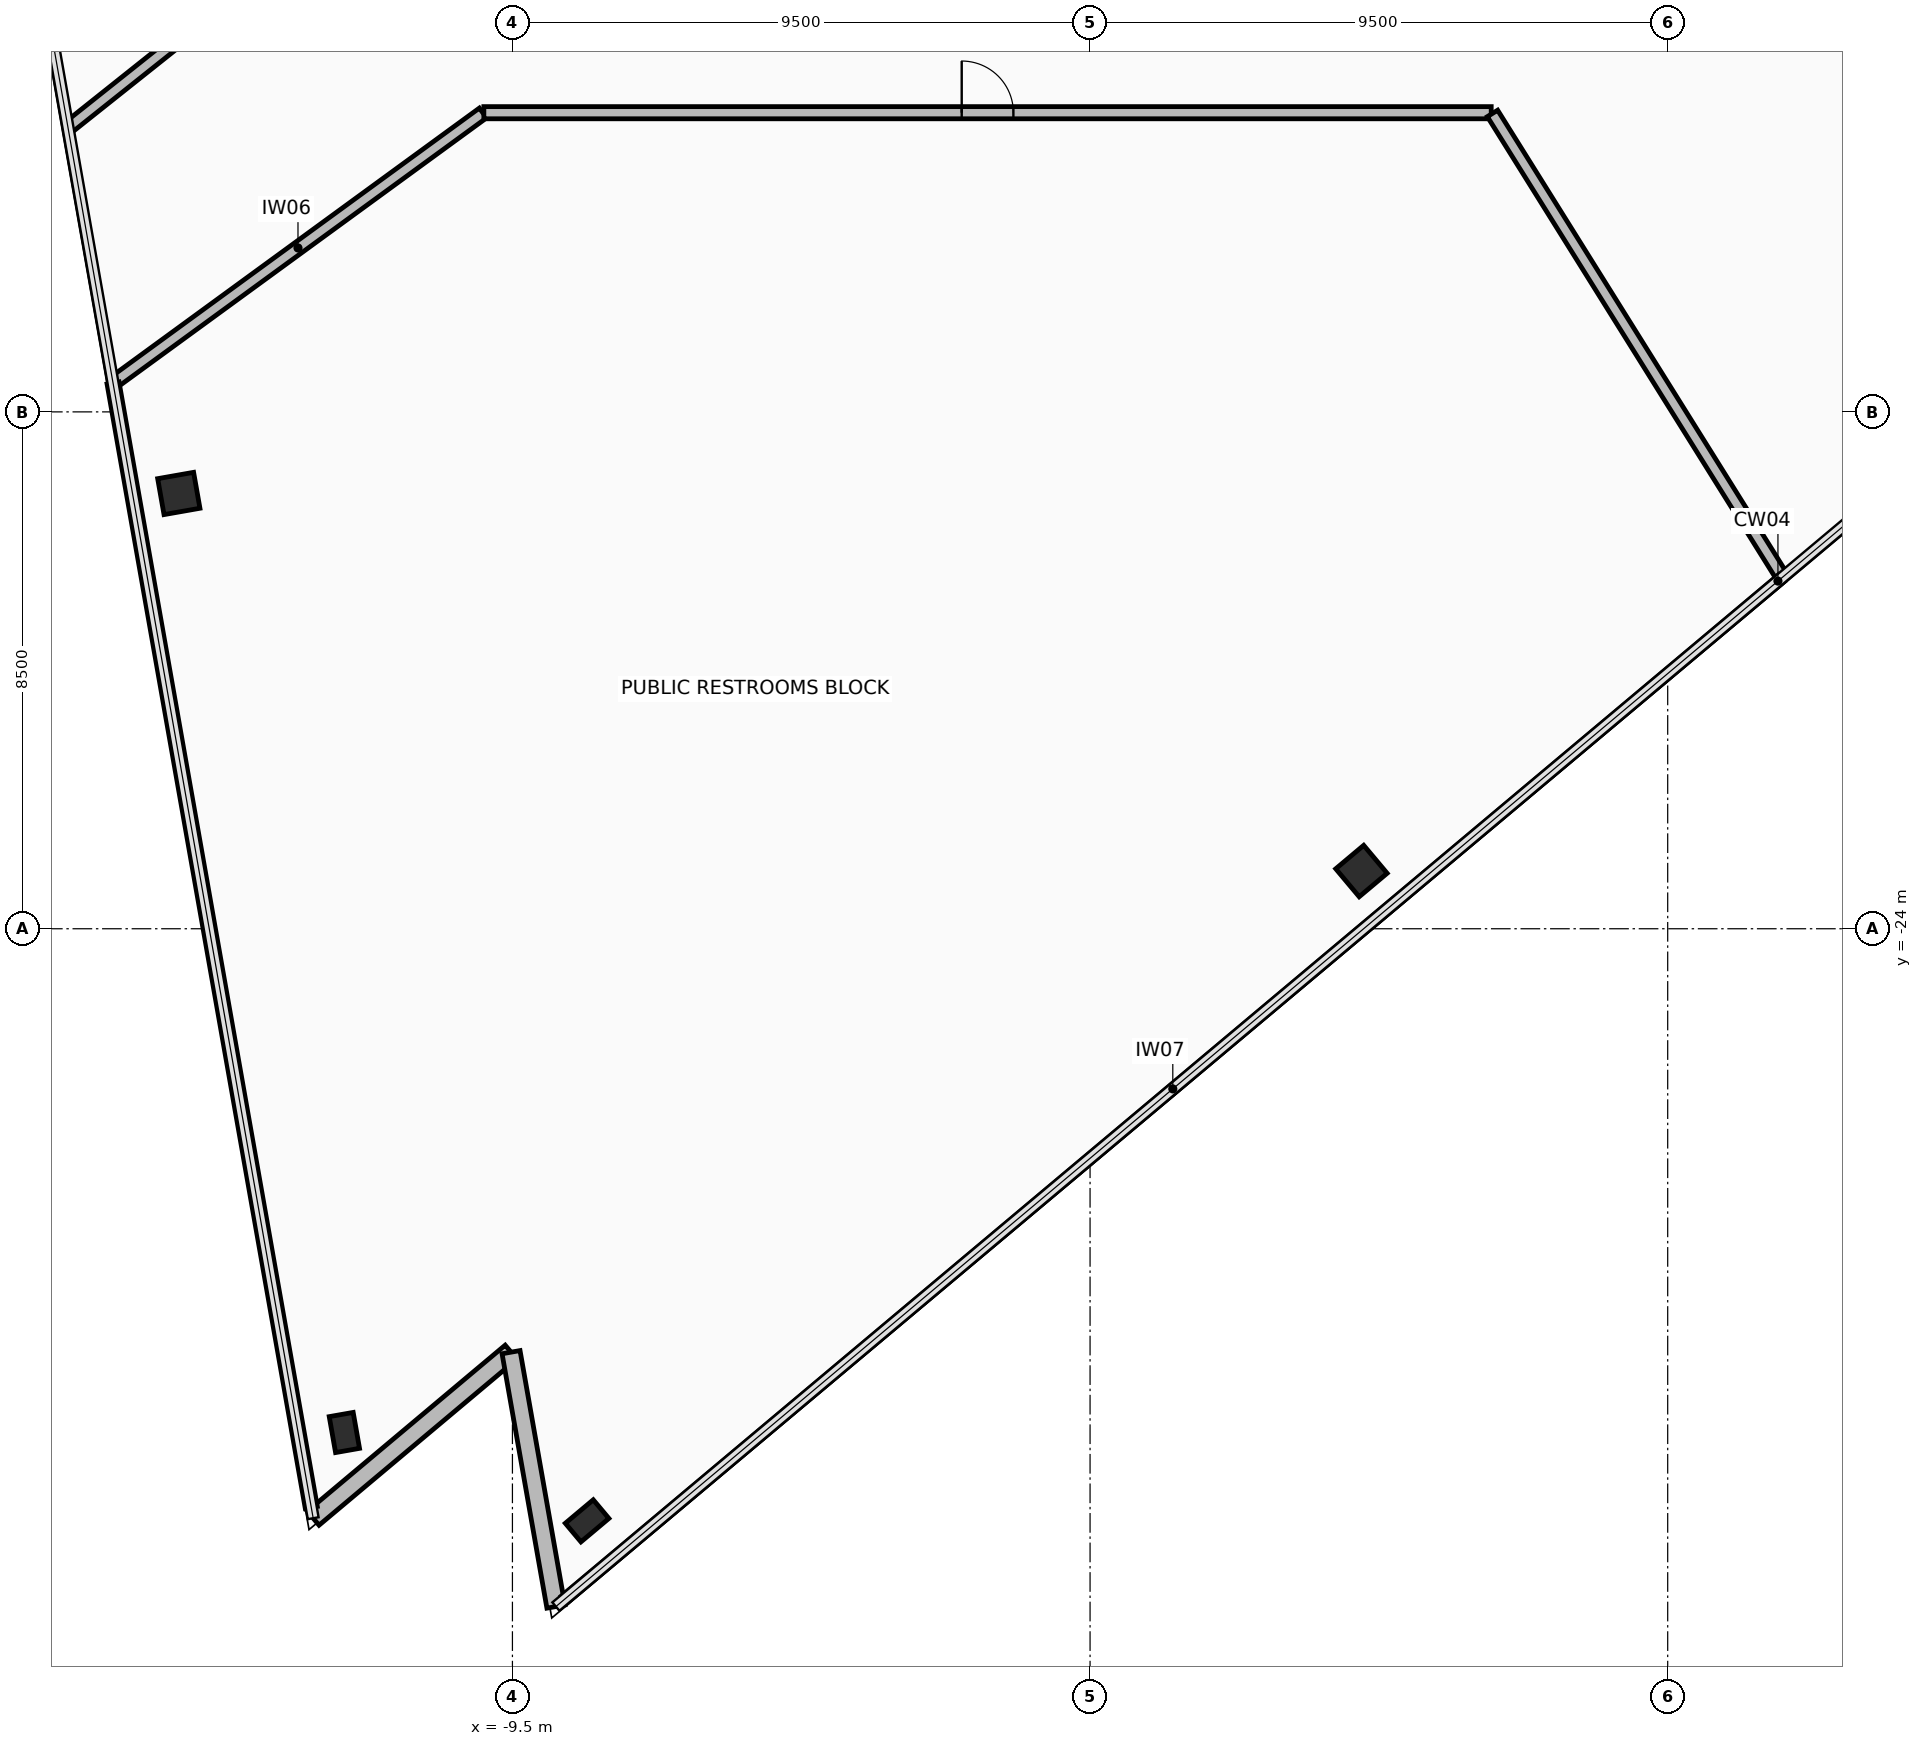
"""IFC4 building model, lengths in metres.
Left out: names, types, materials, properties, quantities, classifications, styles, units other than length and angle.
Written with IfcOpenShell. Run it as: python <this file> out.ifc"""

import sys

from ifc_helpers import new_model, si_unit, direction, frame, frame_2d, origin, origin_2d, place, context, subcontext, project, spatial, rectangle, hollow_rectangle, extrude, element, fill, save


model = new_model("IFC4")
c1 = context("Model", 3, precision=1e-05, world=origin(), true_north=direction((0.0, 1.0)))
c2 = subcontext(c1, "Body", "Model", "MODEL_VIEW")
j1 = project(units=[si_unit("LENGTHUNIT", "METRE"), si_unit("PLANEANGLEUNIT", "RADIAN")], contexts=[c1])
p1 = place(None, origin())
s1 = spatial("IfcSite", under=j1, at=p1, CompositionType="ELEMENT")
p2 = place(p1, origin())
s2 = spatial("IfcBuilding", under=s1, at=p2, CompositionType="ELEMENT")
p3 = place(p2, frame((0.0, 0.0, 192.1)))
s3 = spatial("IfcBuildingStorey", under=s2, at=p3, CompositionType="ELEMENT", Elevation=192.1)
p4 = place(p3, frame((-14.987, -16.842, 0.0), z_axis=(0.0, 0.0, 1.0), x_axis=(-0.173648177667, 0.984807753012, 0.0)))
e1 = element("IfcColumn", 1, at=p4, inside=s3, PredefinedType="COLUMN", context=c2, shape_type="SweptSolid", body=[
    extrude(hollow_rectangle(XDim=0.6, YDim=0.6, WallThickness=0.036, at=origin_2d()), origin(), (0.0, 0.0, 1.0), 4.75),
])
for number, where, z_axis, x_axis in (
    (2, (-12.264, -32.284, 0.0), (0.0, 0.0, 1.0), (-0.174, 0.985, 0.0)),
    (3, (-8.272, -33.737, 0.0), (0.0, 0.0, 1.0), (0.766, 0.643, 0.0)),
):
    element("IfcColumn", number, at=place(p3, frame(where, z_axis=z_axis, x_axis=x_axis)), inside=s3, PredefinedType="COLUMN", context=c2, shape_type="SweptSolid", body=[
        extrude(hollow_rectangle(XDim=0.4, YDim=0.6, WallThickness=0.03, at=origin_2d()), origin(), (0.0, 0.0, 1.0), 4.75),
    ])
p5 = place(p3, frame((4.463, -23.051, 0.0), z_axis=(0.0, 0.0, 1.0), x_axis=(0.766043321242, 0.642788946685, 0.0)))
e4 = element("IfcColumn", 4, at=p5, inside=s3, PredefinedType="COLUMN", context=c2, shape_type="SweptSolid", body=[
    extrude(hollow_rectangle(XDim=0.6, YDim=0.6, WallThickness=0.036, at=origin_2d()), origin(), (0.0, 0.0, 1.0), 4.75),
])
for number, where, z_axis, x_axis in (
    (5, (-12.777, -33.694, 0.0), (0.0, 0.0, 1.0), (0.766, 0.643, 0.0)),
    (6, (-9.523, -30.963, 0.0), (0.0, 0.0, 1.0), (0.174, -0.985, 0.0)),
):
    element("IfcWall", number, at=place(p3, frame(where, z_axis=z_axis, x_axis=x_axis)), inside=s3, PredefinedType="STANDARD", context=c2, shape_type="SweptSolid", body=[
        extrude(rectangle(XDim=4.248, YDim=0.3, at=frame_2d((2.124, 0.0))), origin(), (0.0, 0.0, 1.0), 2.255),
    ])
p6 = place(p3, frame((-16.069, -15.024, 0.0), z_axis=(0.0, 0.0, 1.0), x_axis=(0.807835167635, 0.589408467815, 0.0)))
e7 = element("IfcWall", 7, at=p6, inside=s3, PredefinedType="PARTITIONING", context=c2, shape_type="SweptSolid", body=[
    extrude(rectangle(XDim=7.531, YDim=0.2, at=frame_2d((3.766, 0.0))), origin(), (0.0, 0.0, 1.0), 2.255),
])
p7 = place(p3, frame((-9.97, -10.58, 0.0), z_axis=(0.0, 0.0, 1.0), x_axis=(1.0, 0.0, 0.0)))
e8 = element("IfcWall", 8, at=p7, inside=s3, PredefinedType="PARTITIONING", context=c2, shape_type="SweptSolid", body=[
    extrude(rectangle(XDim=16.567, YDim=0.2, at=frame_2d((8.284, 0.0))), origin(), (0.0, 0.0, 1.0), 2.355),
])
p8 = place(p7, frame((7.859, 0.0, 0.0)))
e9 = element("IfcOpeningElement", 9, at=p8, cuts=e8, PredefinedType="OPENING", context=c2, shape_type="SweptSolid", body=[
    extrude(rectangle(XDim=0.85, YDim=2.1, at=frame_2d((0.425, 1.05))), frame((0.0, 0.11, 0.0), z_axis=(0.0, -1.0, 0.0), x_axis=(1.0, 0.0, 0.0)), (0.0, 0.0, 1.0), 0.22),
])
p9 = place(p3, frame((6.618, -10.592, 0.0), z_axis=(0.0, 0.0, 1.0), x_axis=(0.52993291872, -0.848039563733, 0.0)))
e10 = element("IfcWall", 10, at=p9, inside=s3, PredefinedType="PARTITIONING", context=c2, shape_type="SweptSolid", body=[
    extrude(rectangle(XDim=8.975, YDim=0.2, at=frame_2d((4.487, 0.0))), origin(), (0.0, 0.0, 1.0), 2.255),
])
p10 = place(p3, frame((11.369, -18.235, 0.0), z_axis=(0.0, 0.0, 1.0), x_axis=(-0.766038824694, -0.642794305405, 0.0)))
e11 = element("IfcWall", 11, at=p10, inside=s3, PredefinedType="PARTITIONING", context=c2, shape_type="SweptSolid", body=[
    extrude(rectangle(XDim=26.131, YDim=0.15, at=frame_2d((13.065, 0.0))), origin(), (0.0, 0.0, 1.0), 2.355),
])
p11 = place(p3, frame((-12.808, -33.518, 0.0), z_axis=(0.0, 0.0, 1.0), x_axis=(-0.173651092949, 0.984807238965, 0.0)))
e12 = element("IfcWall", 12, at=p11, inside=s3, PredefinedType="PARTITIONING", context=c2, shape_type="SweptSolid", body=[
    extrude(rectangle(XDim=18.779, YDim=0.2, at=frame_2d((9.39, 0.0))), origin(), (0.0, 0.0, 1.0), 4.56),
])
p12 = place(p3, frame((-11.889, -6.911, 0.0), z_axis=(0.0, 0.0, 1.0), x_axis=(-0.782381746657, -0.622799167066, 0.0)))
e13 = element("IfcWall", 13, at=p12, inside=s3, PredefinedType="PARTITIONING", context=c2, shape_type="SweptSolid", body=[
    extrude(rectangle(XDim=6.288, YDim=0.2, at=frame_2d((3.144, 0.0))), origin(), (0.0, 0.0, 1.0), 2.255),
])
p13 = place(p3, frame((18.548, -12.211, 0.0), z_axis=(0.0, 0.0, 1.0), x_axis=(-0.782380574332, 0.622800639778, 0.0)))
e14 = element("IfcWall", 14, at=p13, inside=s3, PredefinedType="PARTITIONING", context=c2, shape_type="SweptSolid", body=[
    extrude(rectangle(XDim=8.511, YDim=0.2, at=frame_2d((4.255, 0.0))), origin(), (0.0, 0.0, 1.0), 2.255),
])
p14 = place(p8, origin())
e15 = element("IfcDoor", 15, at=p14, inside=s3, OperationType="SINGLE_SWING_RIGHT", PredefinedType="DOOR", context=c2, shape_type="SweptSolid", body=[
    extrude(rectangle(XDim=0.85, YDim=2.1, at=frame_2d((0.425, 1.05))), frame((0.0, 0.025, 0.0), z_axis=(0.0, -1.0, 0.0), x_axis=(1.0, 0.0, 0.0)), (0.0, 0.0, 1.0), 0.05),
])
fill(e9, e15)
save(model, sys.argv[1])
